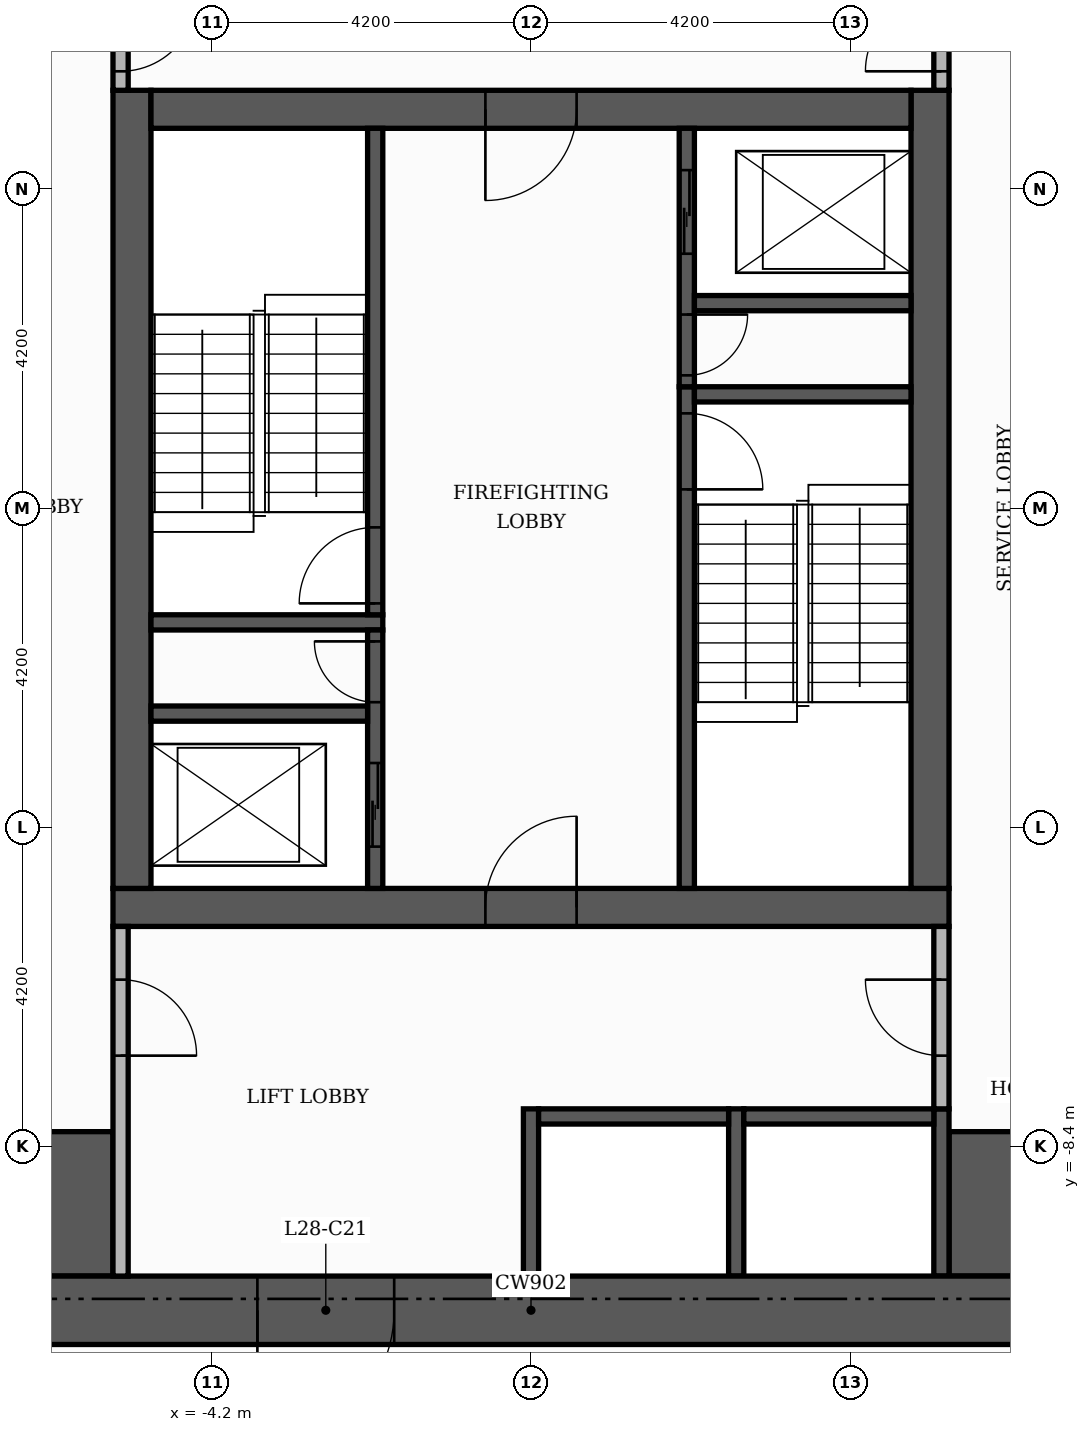
"""IFC4 building model, lengths in metres.
Left out: names, types, materials, properties, quantities, classifications, styles, units other than length and angle.
Written with IfcOpenShell. Run it as: python <this file> out.ifc"""

import sys

from ifc_helpers import new_model, si_unit, direction, frame, frame_2d, origin, place, context, subcontext, project, spatial, rectangle, extrude, element, fill, save


model = new_model("IFC4")
c1 = context("Model", 3, precision=1e-05, world=origin(), true_north=direction((0.0, 1.0)))
c2 = subcontext(c1, "Body", "Model", "MODEL_VIEW")
j1 = project(units=[si_unit("LENGTHUNIT", "METRE"), si_unit("PLANEANGLEUNIT", "RADIAN")], contexts=[c1])
p1 = place(None, origin())
s1 = spatial("IfcSite", under=j1, at=p1, CompositionType="ELEMENT")
p2 = place(p1, origin())
s2 = spatial("IfcBuilding", under=s1, at=p2, CompositionType="ELEMENT")
p3 = place(p2, frame((0.0, 0.0, 118.2)))
s3 = spatial("IfcBuildingStorey", under=s2, at=p3, CompositionType="ELEMENT", Elevation=118.2)
p4 = place(p3, frame((-5.5, -5.25, 0.0), z_axis=(0.0, 0.0, 1.0), x_axis=(1.0, 0.0, 0.0)))
e1 = element("IfcWall", 1, at=p4, inside=s3, PredefinedType="SHEAR", context=c2, shape_type="SweptSolid", body=[
    extrude(rectangle(XDim=11.0, YDim=0.5, at=frame_2d((5.5, 0.0))), origin(), (0.0, 0.0, 1.0), 3.48),
])
p5 = place(p4, frame((4.9, 0.0, 0.0)))
e2 = element("IfcOpeningElement", 2, at=p5, cuts=e1, PredefinedType="OPENING", context=c2, shape_type="SweptSolid", body=[
    extrude(rectangle(XDim=1.2, YDim=2.1, at=frame_2d((0.6, 1.05))), frame((0.0, 0.26, 0.0), z_axis=(0.0, -1.0, 0.0), x_axis=(1.0, 0.0, 0.0)), (0.0, 0.0, 1.0), 0.52),
])
for number, where, z_axis, x_axis in (
    (3, (-5.25, -5.0, 0.0), (0.0, 0.0, 1.0), (0.0, 1.0, 0.0)),
    (4, (5.25, -5.0, 0.0), (0.0, 0.0, 1.0), (0.0, 1.0, 0.0)),
):
    element("IfcWall", number, at=place(p3, frame(where, z_axis=z_axis, x_axis=x_axis)), inside=s3, PredefinedType="SHEAR", context=c2, shape_type="SweptSolid", body=[
        extrude(rectangle(XDim=10.5, YDim=0.5, at=frame_2d((5.25, 0.0))), origin(), (0.0, 0.0, 1.0), 3.48),
    ])
p6 = place(p3, frame((-5.0, 5.25, 0.0), z_axis=(0.0, 0.0, 1.0), x_axis=(1.0, 0.0, 0.0)))
e5 = element("IfcWall", 5, at=p6, inside=s3, PredefinedType="SHEAR", context=c2, shape_type="SweptSolid", body=[
    extrude(rectangle(XDim=10.0, YDim=0.5, at=frame_2d((5.0, 0.0))), origin(), (0.0, 0.0, 1.0), 3.48),
])
p7 = place(p6, frame((4.4, 0.0, 0.0)))
e6 = element("IfcOpeningElement", 6, at=p7, cuts=e5, PredefinedType="OPENING", context=c2, shape_type="SweptSolid", body=[
    extrude(rectangle(XDim=1.2, YDim=2.1, at=frame_2d((0.6, 1.05))), frame((0.0, 0.26, 0.0), z_axis=(0.0, -1.0, 0.0), x_axis=(1.0, 0.0, 0.0)), (0.0, 0.0, 1.0), 0.52),
])
for number, where, z_axis, x_axis in (
    (7, (-10.1, -9.15, 0.0), (0.0, 0.0, 1.0), (1.0, 0.0, 0.0)),
    (8, (5.5, -9.15, 0.0), (0.0, 0.0, 1.0), (1.0, 0.0, 0.0)),
):
    element("IfcWall", number, at=place(p3, frame(where, z_axis=z_axis, x_axis=x_axis)), inside=s3, PredefinedType="SHEAR", context=c2, shape_type="SweptSolid", body=[
        extrude(rectangle(XDim=4.6, YDim=1.9, at=frame_2d((2.3, 0.0))), origin(), (0.0, 0.0, 1.0), 3.48),
    ])
p8 = place(p3, frame((2.05, -5.0, 0.0), z_axis=(0.0, 0.0, 1.0), x_axis=(0.0, 1.0, 0.0)))
e9 = element("IfcWall", 9, at=p8, inside=s3, PredefinedType="SHEAR", context=c2, shape_type="SweptSolid", body=[
    extrude(rectangle(XDim=6.6, YDim=0.2, at=frame_2d((3.3, 0.0))), origin(), (0.0, 0.0, 1.0), 3.48),
])
p9 = place(p8, frame((5.25, 0.0, 0.0)))
e10 = element("IfcOpeningElement", 10, at=p9, cuts=e9, PredefinedType="OPENING", context=c2, shape_type="SweptSolid", body=[
    extrude(rectangle(XDim=1.0, YDim=2.1, at=frame_2d((0.5, 1.05))), frame((0.0, 0.11, 0.0), z_axis=(0.0, -1.0, 0.0), x_axis=(1.0, 0.0, 0.0)), (0.0, 0.0, 1.0), 0.22),
])
p10 = place(p3, frame((-5.0, -1.5, 0.0), z_axis=(0.0, 0.0, 1.0), x_axis=(1.0, 0.0, 0.0)))
e11 = element("IfcWall", 11, at=p10, inside=s3, PredefinedType="SHEAR", context=c2, shape_type="SweptSolid", body=[
    extrude(rectangle(XDim=3.05, YDim=0.2, at=frame_2d((1.525, 0.0))), origin(), (0.0, 0.0, 1.0), 3.48),
])
p11 = place(p3, frame((-2.05, -1.4, 0.0), z_axis=(0.0, 0.0, 1.0), x_axis=(0.0, 1.0, 0.0)))
e12 = element("IfcWall", 12, at=p11, inside=s3, PredefinedType="SHEAR", context=c2, shape_type="SweptSolid", body=[
    extrude(rectangle(XDim=6.4, YDim=0.2, at=frame_2d((3.2, 0.0))), origin(), (0.0, 0.0, 1.0), 3.48),
])
p12 = place(p11, frame((0.15, 0.0, 0.0)))
e13 = element("IfcOpeningElement", 13, at=p12, cuts=e12, PredefinedType="OPENING", context=c2, shape_type="SweptSolid", body=[
    extrude(rectangle(XDim=1.0, YDim=2.1, at=frame_2d((0.5, 1.05))), frame((0.0, 0.11, 0.0), z_axis=(0.0, -1.0, 0.0), x_axis=(1.0, 0.0, 0.0)), (0.0, 0.0, 1.0), 0.22),
])
p13 = place(p3, frame((2.15, 1.5, 0.0), z_axis=(0.0, 0.0, 1.0), x_axis=(1.0, 0.0, 0.0)))
e14 = element("IfcWall", 14, at=p13, inside=s3, PredefinedType="SHEAR", context=c2, shape_type="SweptSolid", body=[
    extrude(rectangle(XDim=2.85, YDim=0.2, at=frame_2d((1.425, 0.0))), origin(), (0.0, 0.0, 1.0), 3.48),
])
for number, where, z_axis, x_axis in (
    (15, (0.0, -10.1, 0.0), (0.0, 0.0, 1.0), (0.0, 1.0, 0.0)),
    (16, (2.7, -10.1, 0.0), (0.0, 0.0, 1.0), (0.0, 1.0, 0.0)),
    (17, (5.4, -10.1, 0.0), (0.0, 0.0, 1.0), (0.0, 1.0, 0.0)),
):
    element("IfcWall", number, at=place(p3, frame(where, z_axis=z_axis, x_axis=x_axis)), inside=s3, PredefinedType="SHEAR", context=c2, shape_type="SweptSolid", body=[
        extrude(rectangle(XDim=2.2, YDim=0.2, at=frame_2d((1.1, 0.0))), origin(), (0.0, 0.0, 1.0), 3.48),
    ])
for number, where, z_axis, x_axis in (
    (18, (0.1, -8.0, 0.0), (0.0, 0.0, 1.0), (1.0, 0.0, 0.0)),
    (19, (2.8, -8.0, 0.0), (0.0, 0.0, 1.0), (1.0, 0.0, 0.0)),
):
    element("IfcWall", number, at=place(p3, frame(where, z_axis=z_axis, x_axis=x_axis)), inside=s3, PredefinedType="SHEAR", context=c2, shape_type="SweptSolid", body=[
        extrude(rectangle(XDim=2.5, YDim=0.2, at=frame_2d((1.25, 0.0))), origin(), (0.0, 0.0, 1.0), 3.48),
    ])
p14 = place(p3, frame((-2.05, -5.0, 0.0), z_axis=(0.0, 0.0, 1.0), x_axis=(0.0, 1.0, 0.0)))
e20 = element("IfcWall", 20, at=p14, inside=s3, PredefinedType="SHEAR", context=c2, shape_type="SweptSolid", body=[
    extrude(rectangle(XDim=3.4, YDim=0.2, at=frame_2d((1.7, 0.0))), origin(), (0.0, 0.0, 1.0), 3.48),
])
p15 = place(p14, frame((0.55, 0.0, 0.0)))
e21 = element("IfcOpeningElement", 21, at=p15, cuts=e20, PredefinedType="OPENING", context=c2, shape_type="SweptSolid", body=[
    extrude(rectangle(XDim=1.1, YDim=2.1, at=frame_2d((0.55, 1.05))), frame((0.0, 0.11, 0.0), z_axis=(0.0, -1.0, 0.0), x_axis=(1.0, 0.0, 0.0)), (0.0, 0.0, 1.0), 0.22),
])
p16 = place(p14, frame((2.45, 0.0, 0.0)))
e22 = element("IfcOpeningElement", 22, at=p16, cuts=e20, PredefinedType="OPENING", context=c2, shape_type="SweptSolid", body=[
    extrude(rectangle(XDim=0.8, YDim=2.1, at=frame_2d((0.4, 1.05))), frame((0.0, 0.11, 0.0), z_axis=(0.0, -1.0, 0.0), x_axis=(1.0, 0.0, 0.0)), (0.0, 0.0, 1.0), 0.22),
])
p17 = place(p3, frame((-5.0, -2.7, 0.0), z_axis=(0.0, 0.0, 1.0), x_axis=(1.0, 0.0, 0.0)))
e23 = element("IfcWall", 23, at=p17, inside=s3, PredefinedType="SHEAR", context=c2, shape_type="SweptSolid", body=[
    extrude(rectangle(XDim=2.85, YDim=0.2, at=frame_2d((1.425, 0.0))), origin(), (0.0, 0.0, 1.0), 3.48),
])
p18 = place(p3, frame((2.05, 1.6, 0.0), z_axis=(0.0, 0.0, 1.0), x_axis=(0.0, 1.0, 0.0)))
e24 = element("IfcWall", 24, at=p18, inside=s3, PredefinedType="SHEAR", context=c2, shape_type="SweptSolid", body=[
    extrude(rectangle(XDim=3.4, YDim=0.2, at=frame_2d((1.7, 0.0))), origin(), (0.0, 0.0, 1.0), 3.48),
])
p19 = place(p18, frame((1.75, 0.0, 0.0)))
e25 = element("IfcOpeningElement", 25, at=p19, cuts=e24, PredefinedType="OPENING", context=c2, shape_type="SweptSolid", body=[
    extrude(rectangle(XDim=1.1, YDim=2.1, at=frame_2d((0.55, 1.05))), frame((0.0, 0.11, 0.0), z_axis=(0.0, -1.0, 0.0), x_axis=(1.0, 0.0, 0.0)), (0.0, 0.0, 1.0), 0.22),
])
p20 = place(p18, frame((0.15, 0.0, 0.0)))
e26 = element("IfcOpeningElement", 26, at=p20, cuts=e24, PredefinedType="OPENING", context=c2, shape_type="SweptSolid", body=[
    extrude(rectangle(XDim=0.8, YDim=2.1, at=frame_2d((0.4, 1.05))), frame((0.0, 0.11, 0.0), z_axis=(0.0, -1.0, 0.0), x_axis=(1.0, 0.0, 0.0)), (0.0, 0.0, 1.0), 0.22),
])
p21 = place(p3, frame((2.15, 2.7, 0.0), z_axis=(0.0, 0.0, 1.0), x_axis=(1.0, 0.0, 0.0)))
e27 = element("IfcWall", 27, at=p21, inside=s3, PredefinedType="SHEAR", context=c2, shape_type="SweptSolid", body=[
    extrude(rectangle(XDim=2.85, YDim=0.2, at=frame_2d((1.425, 0.0))), origin(), (0.0, 0.0, 1.0), 3.48),
])
p22 = place(p3, frame((-11.0, -10.55, 0.0), z_axis=(0.0, 0.0, 1.0), x_axis=(1.0, 0.0, 0.0)))
e28 = element("IfcWall", 28, at=p22, inside=s3, PredefinedType="SHEAR", context=c2, shape_type="SweptSolid", body=[
    extrude(rectangle(XDim=22.0, YDim=0.9, at=frame_2d((11.0, 0.0))), origin(), (0.0, 0.0, 1.0), 3.48),
])
p23 = place(p22, frame((7.4, 0.0, 0.0)))
e29 = element("IfcOpeningElement", 29, at=p23, cuts=e28, PredefinedType="OPENING", context=c2, shape_type="SweptSolid", body=[
    extrude(rectangle(XDim=1.8, YDim=2.2, at=frame_2d((0.9, 1.1))), frame((0.0, 0.46, 0.0), z_axis=(0.0, -1.0, 0.0), x_axis=(1.0, 0.0, 0.0)), (0.0, 0.0, 1.0), 0.92),
])
p24 = place(p3, frame((-5.4, -10.1, 0.0), z_axis=(0.0, 0.0, 1.0), x_axis=(0.0, 1.0, 0.0)))
e30 = element("IfcWall", 30, at=p24, inside=s3, PredefinedType="PARTITIONING", context=c2, shape_type="SweptSolid", body=[
    extrude(rectangle(XDim=4.6, YDim=0.2, at=frame_2d((2.3, 0.0))), origin(), (0.0, 0.0, 1.0), 3.48),
])
p25 = place(p24, frame((2.9, 0.0, 0.0)))
e31 = element("IfcOpeningElement", 31, at=p25, cuts=e30, PredefinedType="OPENING", context=c2, shape_type="SweptSolid", body=[
    extrude(rectangle(XDim=1.0, YDim=2.1, at=frame_2d((0.5, 1.05))), frame((0.0, 0.11, 0.0), z_axis=(0.0, -1.0, 0.0), x_axis=(1.0, 0.0, 0.0)), (0.0, 0.0, 1.0), 0.22),
])
p26 = place(p3, frame((5.4, -7.9, 0.0), z_axis=(0.0, 0.0, 1.0), x_axis=(0.0, 1.0, 0.0)))
e32 = element("IfcWall", 32, at=p26, inside=s3, PredefinedType="PARTITIONING", context=c2, shape_type="SweptSolid", body=[
    extrude(rectangle(XDim=2.4, YDim=0.2, at=frame_2d((1.2, 0.0))), origin(), (0.0, 0.0, 1.0), 3.48),
])
p27 = place(p26, frame((0.7, 0.0, 0.0)))
e33 = element("IfcOpeningElement", 33, at=p27, cuts=e32, PredefinedType="OPENING", context=c2, shape_type="SweptSolid", body=[
    extrude(rectangle(XDim=1.0, YDim=2.1, at=frame_2d((0.5, 1.05))), frame((0.0, 0.11, 0.0), z_axis=(0.0, -1.0, 0.0), x_axis=(1.0, 0.0, 0.0)), (0.0, 0.0, 1.0), 0.22),
])
p28 = place(p3, frame((-5.4, 5.5, 0.0), z_axis=(0.0, 0.0, 1.0), x_axis=(0.0, 1.0, 0.0)))
e34 = element("IfcWall", 34, at=p28, inside=s3, PredefinedType="PARTITIONING", context=c2, shape_type="SweptSolid", body=[
    extrude(rectangle(XDim=1.55, YDim=0.2, at=frame_2d((0.775, 0.0))), origin(), (0.0, 0.0, 1.0), 3.48),
])
p29 = place(p28, frame((0.25, 0.0, 0.0)))
e35 = element("IfcOpeningElement", 35, at=p29, cuts=e34, PredefinedType="OPENING", context=c2, shape_type="SweptSolid", body=[
    extrude(rectangle(XDim=1.0, YDim=2.1, at=frame_2d((0.5, 1.05))), frame((0.0, 0.11, 0.0), z_axis=(0.0, -1.0, 0.0), x_axis=(1.0, 0.0, 0.0)), (0.0, 0.0, 1.0), 0.22),
])
p30 = place(p3, frame((5.4, 5.5, 0.0), z_axis=(0.0, 0.0, 1.0), x_axis=(0.0, 1.0, 0.0)))
e36 = element("IfcWall", 36, at=p30, inside=s3, PredefinedType="PARTITIONING", context=c2, shape_type="SweptSolid", body=[
    extrude(rectangle(XDim=4.6, YDim=0.2, at=frame_2d((2.3, 0.0))), origin(), (0.0, 0.0, 1.0), 3.48),
])
p31 = place(p30, frame((0.25, 0.0, 0.0)))
e37 = element("IfcOpeningElement", 37, at=p31, cuts=e36, PredefinedType="OPENING", context=c2, shape_type="SweptSolid", body=[
    extrude(rectangle(XDim=1.0, YDim=2.1, at=frame_2d((0.5, 1.05))), frame((0.0, 0.11, 0.0), z_axis=(0.0, -1.0, 0.0), x_axis=(1.0, 0.0, 0.0)), (0.0, 0.0, 1.0), 0.22),
])
p32 = place(p19, origin())
e38 = element("IfcDoor", 38, at=p32, inside=s3, OperationType="SLIDING_TO_LEFT", PredefinedType="DOOR", context=c2, shape_type="SweptSolid", body=[
    extrude(rectangle(XDim=1.1, YDim=2.1, at=frame_2d((0.55, 1.05))), frame((0.0, 0.025, 0.0), z_axis=(0.0, -1.0, 0.0), x_axis=(1.0, 0.0, 0.0)), (0.0, 0.0, 1.0), 0.05),
])
fill(e25, e38)
p33 = place(p15, origin())
e39 = element("IfcDoor", 39, at=p33, inside=s3, OperationType="SLIDING_TO_LEFT", PredefinedType="DOOR", context=c2, shape_type="SweptSolid", body=[
    extrude(rectangle(XDim=1.1, YDim=2.1, at=frame_2d((0.55, 1.05))), frame((0.0, 0.025, 0.0), z_axis=(0.0, -1.0, 0.0), x_axis=(1.0, 0.0, 0.0)), (0.0, 0.0, 1.0), 0.05),
])
fill(e21, e39)
p34 = place(p12, origin())
e40 = element("IfcDoor", 40, at=p34, inside=s3, OperationType="SINGLE_SWING_LEFT", PredefinedType="DOOR", context=c2, shape_type="SweptSolid", body=[
    extrude(rectangle(XDim=1.0, YDim=2.1, at=frame_2d((0.5, 1.05))), frame((0.0, 0.025, 0.0), z_axis=(0.0, -1.0, 0.0), x_axis=(1.0, 0.0, 0.0)), (0.0, 0.0, 1.0), 0.05),
])
fill(e13, e40)
p35 = place(p9, frame((1.0, 0.0, 0.0), z_axis=(0.0, 0.0, 1.0), x_axis=(-1.0, 0.0, 0.0)))
e41 = element("IfcDoor", 41, at=p35, inside=s3, OperationType="SINGLE_SWING_LEFT", PredefinedType="DOOR", context=c2, shape_type="SweptSolid", body=[
    extrude(rectangle(XDim=1.0, YDim=2.1, at=frame_2d((0.5, 1.05))), frame((0.0, 0.025, 0.0), z_axis=(0.0, -1.0, 0.0), x_axis=(1.0, 0.0, 0.0)), (0.0, 0.0, 1.0), 0.05),
])
fill(e10, e41)
p36 = place(p20, frame((0.8, 0.0, 0.0), z_axis=(0.0, 0.0, 1.0), x_axis=(-1.0, 0.0, 0.0)))
e42 = element("IfcDoor", 42, at=p36, inside=s3, OperationType="SINGLE_SWING_RIGHT", PredefinedType="DOOR", context=c2, shape_type="SweptSolid", body=[
    extrude(rectangle(XDim=0.8, YDim=2.1, at=frame_2d((0.4, 1.05))), frame((0.0, 0.025, 0.0), z_axis=(0.0, -1.0, 0.0), x_axis=(1.0, 0.0, 0.0)), (0.0, 0.0, 1.0), 0.05),
])
fill(e26, e42)
p37 = place(p16, origin())
e43 = element("IfcDoor", 43, at=p37, inside=s3, OperationType="SINGLE_SWING_RIGHT", PredefinedType="DOOR", context=c2, shape_type="SweptSolid", body=[
    extrude(rectangle(XDim=0.8, YDim=2.1, at=frame_2d((0.4, 1.05))), frame((0.0, 0.025, 0.0), z_axis=(0.0, -1.0, 0.0), x_axis=(1.0, 0.0, 0.0)), (0.0, 0.0, 1.0), 0.05),
])
fill(e22, e43)
p38 = place(p7, frame((1.2, 0.0, 0.0), z_axis=(0.0, 0.0, 1.0), x_axis=(-1.0, 0.0, 0.0)))
e44 = element("IfcDoor", 44, at=p38, inside=s3, OperationType="SINGLE_SWING_LEFT", PredefinedType="DOOR", context=c2, shape_type="SweptSolid", body=[
    extrude(rectangle(XDim=1.2, YDim=2.1, at=frame_2d((0.6, 1.05))), frame((0.0, 0.025, 0.0), z_axis=(0.0, -1.0, 0.0), x_axis=(1.0, 0.0, 0.0)), (0.0, 0.0, 1.0), 0.05),
])
fill(e6, e44)
p39 = place(p5, origin())
e45 = element("IfcDoor", 45, at=p39, inside=s3, OperationType="SINGLE_SWING_RIGHT", PredefinedType="DOOR", context=c2, shape_type="SweptSolid", body=[
    extrude(rectangle(XDim=1.2, YDim=2.1, at=frame_2d((0.6, 1.05))), frame((0.0, 0.025, 0.0), z_axis=(0.0, -1.0, 0.0), x_axis=(1.0, 0.0, 0.0)), (0.0, 0.0, 1.0), 0.05),
])
fill(e2, e45)
p40 = place(p29, frame((1.0, 0.0, 0.0), z_axis=(0.0, 0.0, 1.0), x_axis=(-1.0, 0.0, 0.0)))
e46 = element("IfcDoor", 46, at=p40, inside=s3, OperationType="SINGLE_SWING_RIGHT", PredefinedType="DOOR", context=c2, shape_type="SweptSolid", body=[
    extrude(rectangle(XDim=1.0, YDim=2.1, at=frame_2d((0.5, 1.05))), frame((0.0, 0.025, 0.0), z_axis=(0.0, -1.0, 0.0), x_axis=(1.0, 0.0, 0.0)), (0.0, 0.0, 1.0), 0.05),
])
fill(e35, e46)
p41 = place(p31, origin())
e47 = element("IfcDoor", 47, at=p41, inside=s3, OperationType="SINGLE_SWING_LEFT", PredefinedType="DOOR", context=c2, shape_type="SweptSolid", body=[
    extrude(rectangle(XDim=1.0, YDim=2.1, at=frame_2d((0.5, 1.05))), frame((0.0, 0.025, 0.0), z_axis=(0.0, -1.0, 0.0), x_axis=(1.0, 0.0, 0.0)), (0.0, 0.0, 1.0), 0.05),
])
fill(e37, e47)
p42 = place(p25, frame((1.0, 0.0, 0.0), z_axis=(0.0, 0.0, 1.0), x_axis=(-1.0, 0.0, 0.0)))
e48 = element("IfcDoor", 48, at=p42, inside=s3, OperationType="SINGLE_SWING_LEFT", PredefinedType="DOOR", context=c2, shape_type="SweptSolid", body=[
    extrude(rectangle(XDim=1.0, YDim=2.1, at=frame_2d((0.5, 1.05))), frame((0.0, 0.025, 0.0), z_axis=(0.0, -1.0, 0.0), x_axis=(1.0, 0.0, 0.0)), (0.0, 0.0, 1.0), 0.05),
])
fill(e31, e48)
p43 = place(p27, origin())
e49 = element("IfcDoor", 49, at=p43, inside=s3, OperationType="SINGLE_SWING_RIGHT", PredefinedType="DOOR", context=c2, shape_type="SweptSolid", body=[
    extrude(rectangle(XDim=1.0, YDim=2.1, at=frame_2d((0.5, 1.05))), frame((0.0, 0.025, 0.0), z_axis=(0.0, -1.0, 0.0), x_axis=(1.0, 0.0, 0.0)), (0.0, 0.0, 1.0), 0.05),
])
fill(e33, e49)
p44 = place(p23, frame((1.8, 0.0, 0.0), z_axis=(0.0, 0.0, 1.0), x_axis=(-1.0, 0.0, 0.0)))
e50 = element("IfcDoor", 50, at=p44, inside=s3, OperationType="DOUBLE_DOOR_SINGLE_SWING", PredefinedType="DOOR", context=c2, shape_type="SweptSolid", body=[
    extrude(rectangle(XDim=1.8, YDim=2.2, at=frame_2d((0.9, 1.1))), frame((0.0, 0.025, 0.0), z_axis=(0.0, -1.0, 0.0), x_axis=(1.0, 0.0, 0.0)), (0.0, 0.0, 1.0), 0.05),
])
fill(e29, e50)
save(model, sys.argv[1])
